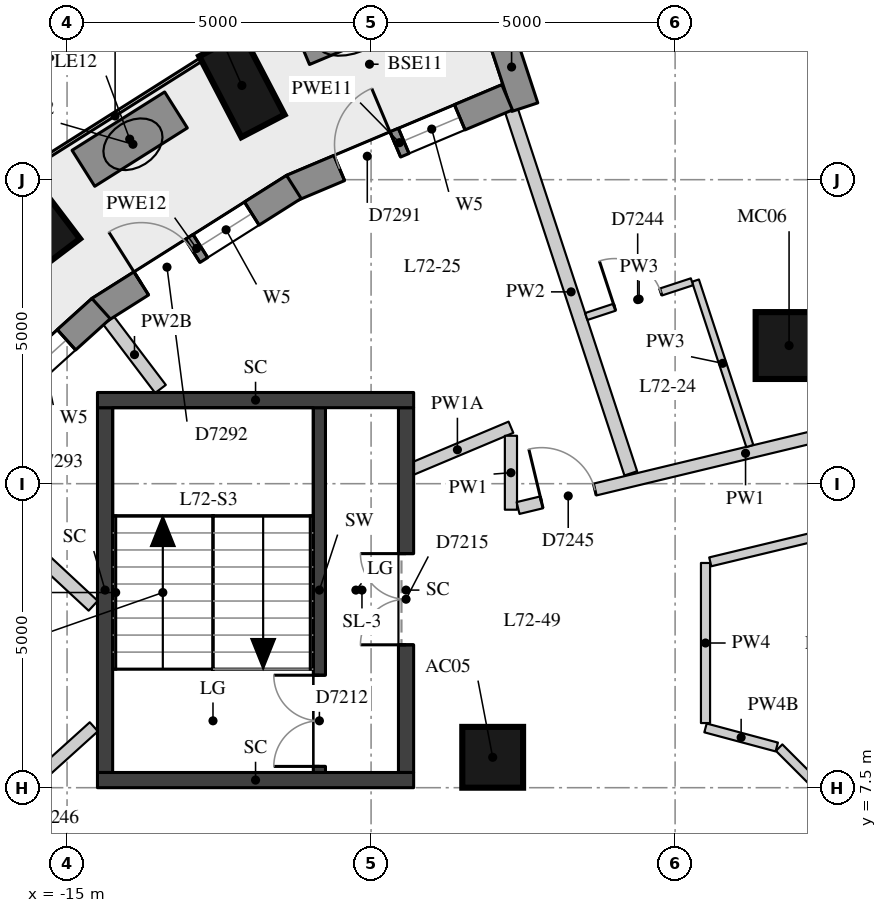
"""IFC4 building model, lengths in metres.
Left out: names, types, materials, properties, quantities, classifications, styles, units other than length and angle.
Written with IfcOpenShell. Run it as: python <this file> out.ifc"""

import sys

from ifc_helpers import new_model, si_unit, direction, frame, frame_2d, origin, origin_2d, place, context, subcontext, project, spatial, rectangle, extrude, element, fill, save


model = new_model("IFC4")
c1 = context("Model", 3, precision=1e-05, world=origin(), true_north=direction((0.0, 1.0)))
c2 = subcontext(c1, "Body", "Model", "MODEL_VIEW")
j1 = project(units=[si_unit("LENGTHUNIT", "METRE"), si_unit("PLANEANGLEUNIT", "RADIAN")], contexts=[c1])
p1 = place(None, origin())
s1 = spatial("IfcSite", under=j1, at=p1, CompositionType="ELEMENT")
p2 = place(p1, origin())
s2 = spatial("IfcBuilding", under=s1, at=p2, CompositionType="ELEMENT")
p3 = place(p2, frame((0.0, 0.0, 253.1)))
s3 = spatial("IfcBuildingStorey", under=s2, at=p3, CompositionType="ELEMENT", Elevation=253.1)
for number, where, z_axis, x_axis in (
    (1, (-12.125, 19.05, 0.0), (0.0, 0.0, 1.0), (-0.462, 0.887, 0.0)),
    (2, (-15.559, 16.885, 0.0), (0.0, 0.0, 1.0), (-0.604, 0.797, 0.0)),
):
    element("IfcColumn", number, at=place(p3, frame(where, z_axis=z_axis, x_axis=x_axis)), inside=s3, PredefinedType="COLUMN", context=c2, shape_type="SweptSolid", body=[
        extrude(rectangle(XDim=1.5, YDim=0.8, at=origin_2d()), origin(), (0.0, 0.0, 1.0), 3.3),
    ])
p4 = place(p3, frame((-8.0, 8.0, 0.0), z_axis=(0.0, 0.0, 1.0), x_axis=(1.0, 0.0, 0.0)))
e3 = element("IfcColumn", 3, at=p4, inside=s3, PredefinedType="COLUMN", context=c2, shape_type="SweptSolid", body=[
    extrude(rectangle(XDim=1.0, YDim=1.0, at=origin_2d()), origin(), (0.0, 0.0, 1.0), 3.3),
])
p5 = place(p3, frame((-3.126, 14.772, 0.0), z_axis=(0.0, 0.0, 1.0), x_axis=(1.0, 0.0, 0.0)))
e4 = element("IfcColumn", 4, at=p5, inside=s3, PredefinedType="COLUMN", context=c2, shape_type="SweptSolid", body=[
    extrude(rectangle(XDim=1.1, YDim=1.1, at=origin_2d()), origin(), (0.0, 0.0, 1.0), 3.3),
])
p6 = place(p3, frame((-7.906, 20.014, 0.0), z_axis=(0.0, 0.0, 1.0), x_axis=(0.312379684595, -0.949957332017, 0.0)))
e5 = element("IfcWall", 5, at=p6, inside=s3, PredefinedType="SOLIDWALL", context=c2, shape_type="SweptSolid", body=[
    extrude(rectangle(XDim=1.39, YDim=0.45, at=frame_2d((0.695, 0.0))), origin(), (0.0, 0.0, 1.0), 3.02),
])
p7 = place(p3, frame((-7.762, 18.855, 0.0), z_axis=(0.0, 0.0, 1.0), x_axis=(-0.921611451737, -0.388113813239, 0.0)))
e6 = element("IfcWall", 6, at=p7, inside=s3, PredefinedType="SOLIDWALL", context=c2, shape_type="SweptSolid", body=[
    extrude(rectangle(XDim=3.842, YDim=0.45, at=frame_2d((1.921, 0.0))), origin(), (0.0, 0.0, 1.0), 3.02),
])
p8 = place(p7, frame((0.846, 0.0, 0.4)))
e7 = element("IfcOpeningElement", 7, at=p8, cuts=e6, PredefinedType="OPENING", context=c2, shape_type="SweptSolid", body=[
    extrude(rectangle(XDim=1.0, YDim=1.75, at=frame_2d((0.5, 0.875))), frame((0.0, 0.235, 0.0), z_axis=(0.0, -1.0, 0.0), x_axis=(1.0, 0.0, 0.0)), (0.0, 0.0, 1.0), 0.47),
])
p9 = place(p7, frame((1.996, 0.0, 0.0)))
e8 = element("IfcOpeningElement", 8, at=p9, cuts=e6, PredefinedType="OPENING", context=c2, shape_type="SweptSolid", body=[
    extrude(rectangle(XDim=1.0, YDim=2.15, at=frame_2d((0.5, 1.075))), frame((0.0, 0.235, 0.0), z_axis=(0.0, -1.0, 0.0), x_axis=(1.0, 0.0, 0.0)), (0.0, 0.0, 1.0), 0.47),
])
p10 = place(p3, frame((-11.27, 17.381, 0.0), z_axis=(0.0, 0.0, 1.0), x_axis=(-0.845176295427, -0.534487632831, 0.0)))
e9 = element("IfcWall", 9, at=p10, inside=s3, PredefinedType="SOLIDWALL", context=c2, shape_type="SweptSolid", body=[
    extrude(rectangle(XDim=3.788, YDim=0.45, at=frame_2d((1.894, 0.0))), origin(), (0.0, 0.0, 1.0), 3.02),
])
p11 = place(p10, frame((0.819, 0.0, 0.4)))
e10 = element("IfcOpeningElement", 10, at=p11, cuts=e9, PredefinedType="OPENING", context=c2, shape_type="SweptSolid", body=[
    extrude(rectangle(XDim=1.0, YDim=1.75, at=frame_2d((0.5, 0.875))), frame((0.0, 0.235, 0.0), z_axis=(0.0, -1.0, 0.0), x_axis=(1.0, 0.0, 0.0)), (0.0, 0.0, 1.0), 0.47),
])
p12 = place(p10, frame((1.969, 0.0, 0.0)))
e11 = element("IfcOpeningElement", 11, at=p12, cuts=e9, PredefinedType="OPENING", context=c2, shape_type="SweptSolid", body=[
    extrude(rectangle(XDim=1.0, YDim=2.15, at=frame_2d((0.5, 1.075))), frame((0.0, 0.235, 0.0), z_axis=(0.0, -1.0, 0.0), x_axis=(1.0, 0.0, 0.0)), (0.0, 0.0, 1.0), 0.47),
])
p13 = place(p3, frame((-14.441, 15.38, 0.0), z_axis=(0.0, 0.0, 1.0), x_axis=(-0.742152631569, -0.670230909057, 0.0)))
e12 = element("IfcWall", 12, at=p13, inside=s3, PredefinedType="SOLIDWALL", context=c2, shape_type="SweptSolid", body=[
    extrude(rectangle(XDim=3.683, YDim=0.45, at=frame_2d((1.842, 0.0))), origin(), (0.0, 0.0, 1.0), 3.02),
])
p14 = place(p13, frame((0.767, 0.0, 0.4)))
e13 = element("IfcOpeningElement", 13, at=p14, cuts=e12, PredefinedType="OPENING", context=c2, shape_type="SweptSolid", body=[
    extrude(rectangle(XDim=1.0, YDim=1.75, at=frame_2d((0.5, 0.875))), frame((0.0, 0.235, 0.0), z_axis=(0.0, -1.0, 0.0), x_axis=(1.0, 0.0, 0.0)), (0.0, 0.0, 1.0), 0.47),
])
p15 = place(p13, frame((1.917, 0.0, 0.0)))
e14 = element("IfcOpeningElement", 14, at=p15, cuts=e12, PredefinedType="OPENING", context=c2, shape_type="SweptSolid", body=[
    extrude(rectangle(XDim=1.0, YDim=2.15, at=frame_2d((0.5, 1.075))), frame((0.0, 0.235, 0.0), z_axis=(0.0, -1.0, 0.0), x_axis=(1.0, 0.0, 0.0)), (0.0, 0.0, 1.0), 0.47),
])
for number, where, z_axis, x_axis in (
    (15, (-9.488, 20.414, 0.0), (0.0, 0.0, 1.0), (-0.922, -0.387, 0.0)),
    (16, (-13.208, 18.647, 0.0), (0.0, 0.0, 1.0), (-0.846, -0.533, 0.0)),
):
    element("IfcWall", number, at=place(p3, frame(where, z_axis=z_axis, x_axis=x_axis)), inside=s3, PredefinedType="USERDEFINED", context=c2, shape_type="SweptSolid", body=[
        extrude(rectangle(XDim=1.8, YDim=0.7, at=frame_2d((0.9, 0.0))), origin(), (0.0, 0.0, 1.0), 0.75),
    ])
p16 = place(p3, frame((-10.85, 7.75, 0.0), z_axis=(0.0, 0.0, 1.0), x_axis=(0.0, 1.0, 0.0)))
e17 = element("IfcWall", 17, at=p16, inside=s3, PredefinedType="SHEAR", context=c2, shape_type="SweptSolid", body=[
    extrude(rectangle(XDim=6.0, YDim=0.2, at=frame_2d((3.0, 0.0))), origin(), (0.0, 0.0, 1.0), 3.02),
])
p17 = place(p16, frame((0.1, 0.0, 0.0)))
e18 = element("IfcOpeningElement", 18, at=p17, cuts=e17, PredefinedType="OPENING", context=c2, shape_type="SweptSolid", body=[
    extrude(rectangle(XDim=1.5, YDim=2.1, at=frame_2d((0.75, 1.05))), frame((0.0, 0.11, 0.0), z_axis=(0.0, -1.0, 0.0), x_axis=(1.0, 0.0, 0.0)), (0.0, 0.0, 1.0), 0.22),
])
p18 = place(p3, frame((-14.375, 7.75, -0.28), z_axis=(0.0, 0.0, 1.0), x_axis=(0.0, 1.0, 0.0)))
e19 = element("IfcWall", 19, at=p18, inside=s3, PredefinedType="SHEAR", context=c2, shape_type="SweptSolid", body=[
    extrude(rectangle(XDim=6.0, YDim=0.25, at=frame_2d((3.0, 0.0))), origin(), (0.0, 0.0, 1.0), 3.3),
])
p19 = place(p3, frame((-9.425, 7.75, -0.28), z_axis=(0.0, 0.0, 1.0), x_axis=(0.0, 1.0, 0.0)))
e20 = element("IfcWall", 20, at=p19, inside=s3, PredefinedType="SHEAR", context=c2, shape_type="SweptSolid", body=[
    extrude(rectangle(XDim=6.0, YDim=0.25, at=frame_2d((3.0, 0.0))), origin(), (0.0, 0.0, 1.0), 3.3),
])
p20 = place(p19, frame((2.1, 0.0, 0.28)))
e21 = element("IfcOpeningElement", 21, at=p20, cuts=e20, PredefinedType="OPENING", context=c2, shape_type="SweptSolid", body=[
    extrude(rectangle(XDim=1.5, YDim=2.1, at=frame_2d((0.75, 1.05))), frame((0.0, 0.135, 0.0), z_axis=(0.0, -1.0, 0.0), x_axis=(1.0, 0.0, 0.0)), (0.0, 0.0, 1.0), 0.27),
])
for number, where, z_axis, x_axis in (
    (22, (-14.5, 13.875, -0.28), (0.0, 0.0, 1.0), (1.0, 0.0, 0.0)),
    (23, (-14.5, 7.625, -0.28), (0.0, 0.0, 1.0), (1.0, 0.0, 0.0)),
):
    element("IfcWall", number, at=place(p3, frame(where, z_axis=z_axis, x_axis=x_axis)), inside=s3, PredefinedType="SHEAR", context=c2, shape_type="SweptSolid", body=[
        extrude(rectangle(XDim=5.2, YDim=0.25, at=frame_2d((2.6, 0.0))), origin(), (0.0, 0.0, 1.0), 3.3),
    ])
p21 = place(p3, frame((-16.24, 6.984, 0.0), z_axis=(0.0, 0.0, 1.0), x_axis=(0.742140692687, 0.67024412885, 0.0)))
e24 = element("IfcWall", 24, at=p21, inside=s3, PredefinedType="PARTITIONING", context=c2, shape_type="SweptSolid", body=[
    extrude(rectangle(XDim=2.265, YDim=0.2, at=frame_2d((1.132, 0.0))), origin(), (0.0, 0.0, 1.0), 3.02),
])
p22 = place(p3, frame((-9.46, 12.687, 0.0), z_axis=(0.0, 0.0, 1.0), x_axis=(0.92164499827, 0.388034144328, 0.0)))
e25 = element("IfcWall", 25, at=p22, inside=s3, PredefinedType="PARTITIONING", context=c2, shape_type="SweptSolid", body=[
    extrude(rectangle(XDim=1.91, YDim=0.2, at=frame_2d((0.955, 0.0))), origin(), (0.0, 0.0, 1.0), 2.57),
])
p23 = place(p3, frame((-7.7, 13.288, 0.0), z_axis=(0.0, 0.0, 1.0), x_axis=(0.0, -1.0, 0.0)))
e26 = element("IfcWall", 26, at=p23, inside=s3, PredefinedType="PARTITIONING", context=c2, shape_type="SweptSolid", body=[
    extrude(rectangle(XDim=1.216, YDim=0.2, at=frame_2d((0.608, 0.0))), origin(), (0.0, 0.0, 1.0), 3.02),
])
p24 = place(p3, frame((-7.583, 12.1, 0.0), z_axis=(0.0, 0.0, 1.0), x_axis=(0.97226305798, 0.233890029903, 0.0)))
e27 = element("IfcWall", 27, at=p24, inside=s3, PredefinedType="PARTITIONING", context=c2, shape_type="SweptSolid", body=[
    extrude(rectangle(XDim=7.696, YDim=0.2, at=frame_2d((3.848, 0.0))), origin(), (0.0, 0.0, 1.0), 3.02),
])
p25 = place(p24, frame((5.85, 0.0, 0.0)))
e28 = element("IfcOpeningElement", 28, at=p25, cuts=e27, PredefinedType="OPENING", context=c2, shape_type="SweptSolid", body=[
    extrude(rectangle(XDim=1.1, YDim=2.1, at=frame_2d((0.55, 1.05))), frame((0.0, 0.11, 0.0), z_axis=(0.0, -1.0, 0.0), x_axis=(1.0, 0.0, 0.0)), (0.0, 0.0, 1.0), 0.22),
])
p26 = place(p24, frame((0.399, 0.0, 0.0)))
e29 = element("IfcOpeningElement", 29, at=p26, cuts=e27, PredefinedType="OPENING", context=c2, shape_type="SweptSolid", body=[
    extrude(rectangle(XDim=0.9, YDim=2.1, at=frame_2d((0.45, 1.05))), frame((0.0, 0.11, 0.0), z_axis=(0.0, -1.0, 0.0), x_axis=(1.0, 0.0, 0.0)), (0.0, 0.0, 1.0), 0.22),
])
p27 = place(p3, frame((-0.927, 5.797, 0.0), z_axis=(0.0, 0.0, 1.0), x_axis=(-0.707106781187, 0.707106781187, 0.0)))
e30 = element("IfcWall", 30, at=p27, inside=s3, PredefinedType="PARTITIONING", context=c2, shape_type="SweptSolid", body=[
    extrude(rectangle(XDim=3.341, YDim=0.15, at=frame_2d((1.67, 0.0))), origin(), (0.0, 0.0, 1.0), 3.02),
])
p28 = place(p3, frame((-3.328, 8.169, 0.0), z_axis=(0.0, 0.0, 1.0), x_axis=(-0.965933680277, 0.258789731841, 0.0)))
e31 = element("IfcWall", 31, at=p28, inside=s3, PredefinedType="PARTITIONING", context=c2, shape_type="SweptSolid", body=[
    extrude(rectangle(XDim=1.213, YDim=0.15, at=frame_2d((0.606, 0.0))), origin(), (0.0, 0.0, 1.0), 2.47),
])
p29 = place(p3, frame((-4.5, 8.563, 0.0), z_axis=(0.0, 0.0, 1.0), x_axis=(0.0, 1.0, 0.0)))
e32 = element("IfcWall", 32, at=p29, inside=s3, PredefinedType="PARTITIONING", context=c2, shape_type="SweptSolid", body=[
    extrude(rectangle(XDim=2.633, YDim=0.15, at=frame_2d((1.316, 0.0))), origin(), (0.0, 0.0, 1.0), 3.02),
])
p30 = place(p3, frame((-4.422, 11.215, 0.0), z_axis=(0.0, 0.0, 1.0), x_axis=(0.972256385538, 0.233917764997, 0.0)))
e33 = element("IfcWall", 33, at=p30, inside=s3, PredefinedType="PARTITIONING", context=c2, shape_type="SweptSolid", body=[
    extrude(rectangle(XDim=4.491, YDim=0.15, at=frame_2d((2.246, 0.0))), origin(), (0.0, 0.0, 1.0), 3.02),
])
p31 = place(p3, frame((-7.692, 18.64, 0.0), z_axis=(0.0, 0.0, 1.0), x_axis=(0.312298025569, -0.949984180514, 0.0)))
e34 = element("IfcWall", 34, at=p31, inside=s3, PredefinedType="PARTITIONING", context=c2, shape_type="SweptSolid", body=[
    extrude(rectangle(XDim=6.285, YDim=0.22, at=frame_2d((3.143, 0.0))), origin(), (0.0, 0.0, 1.0), 3.02),
])
p32 = place(p3, frame((-14.319, 15.187, 0.0), z_axis=(0.0, 0.0, 1.0), x_axis=(0.603937349714, -0.797031792101, 0.0)))
e35 = element("IfcWall", 35, at=p32, inside=s3, PredefinedType="PARTITIONING", context=c2, shape_type="SweptSolid", body=[
    extrude(rectangle(XDim=1.416, YDim=0.22, at=frame_2d((0.708, 0.0))), origin(), (0.0, 0.0, 1.0), 2.57),
])
p33 = place(p3, frame((-17.009, 12.758, 0.0), z_axis=(0.0, 0.0, 1.0), x_axis=(0.732631495403, -0.680625515202, 0.0)))
e36 = element("IfcWall", 36, at=p33, inside=s3, PredefinedType="PARTITIONING", context=c2, shape_type="SweptSolid", body=[
    extrude(rectangle(XDim=3.328, YDim=0.22, at=frame_2d((1.664, 0.0))), origin(), (0.0, 0.0, 1.0), 3.02),
])
p34 = place(p3, frame((-22.004, 7.424, 0.0), z_axis=(0.0, 0.0, 1.0), x_axis=(0.927533826991, -0.373739213607, 0.0)))
e37 = element("IfcWall", 37, at=p34, inside=s3, PredefinedType="PARTITIONING", context=c2, shape_type="SweptSolid", body=[
    extrude(rectangle(XDim=7.614, YDim=0.22, at=frame_2d((3.807, 0.0))), origin(), (0.0, 0.0, 1.0), 3.02),
])
p35 = place(p3, frame((-3.771, 13.12, 0.0), z_axis=(0.0, 0.0, 1.0), x_axis=(-0.312336886671, 0.949971404425, 0.0)))
e38 = element("IfcWall", 38, at=p35, inside=s3, PredefinedType="PARTITIONING", context=c2, shape_type="SweptSolid", body=[
    extrude(rectangle(XDim=2.863, YDim=0.12, at=frame_2d((1.432, 0.0))), origin(), (0.0, 0.0, 1.0), 3.02),
])
p36 = place(p3, frame((-4.722, 15.821, 0.0), z_axis=(0.0, 0.0, 1.0), x_axis=(-0.949995576072, -0.312263359111, 0.0)))
e39 = element("IfcWall", 39, at=p36, inside=s3, PredefinedType="PARTITIONING", context=c2, shape_type="SweptSolid", body=[
    extrude(rectangle(XDim=1.83, YDim=0.12, at=frame_2d((0.915, 0.0))), origin(), (0.0, 0.0, 1.0), 3.02),
])
p37 = place(p36, frame((0.54, 0.0, 0.0)))
e40 = element("IfcOpeningElement", 40, at=p37, cuts=e39, PredefinedType="OPENING", context=c2, shape_type="SweptSolid", body=[
    extrude(rectangle(XDim=0.8, YDim=2.1, at=frame_2d((0.4, 1.05))), frame((0.0, 0.07, 0.0), z_axis=(0.0, -1.0, 0.0), x_axis=(1.0, 0.0, 0.0)), (0.0, 0.0, 1.0), 0.14),
])
p38 = place(p8, origin())
e41 = element("IfcWindow", 41, at=p38, inside=s3, PartitioningType="SINGLE_PANEL", PredefinedType="WINDOW", context=c2, shape_type="SweptSolid", body=[
    extrude(rectangle(XDim=1.0, YDim=1.75, at=frame_2d((0.5, 0.875))), frame((0.0, 0.035, 0.0), z_axis=(0.0, -1.0, 0.0), x_axis=(1.0, 0.0, 0.0)), (0.0, 0.0, 1.0), 0.06),
])
fill(e7, e41)
p39 = place(p9, frame((1.0, 0.0, 0.0), z_axis=(0.0, 0.0, 1.0), x_axis=(-1.0, 0.0, 0.0)))
e42 = element("IfcDoor", 42, at=p39, inside=s3, OperationType="SINGLE_SWING_RIGHT", PredefinedType="DOOR", context=c2, shape_type="SweptSolid", body=[
    extrude(rectangle(XDim=1.0, YDim=2.15, at=frame_2d((0.5, 1.075))), frame((0.0, 0.075, 0.0), z_axis=(0.0, -1.0, 0.0), x_axis=(1.0, 0.0, 0.0)), (0.0, 0.0, 1.0), 0.05),
])
fill(e8, e42)
p40 = place(p11, origin())
e43 = element("IfcWindow", 43, at=p40, inside=s3, PartitioningType="SINGLE_PANEL", PredefinedType="WINDOW", context=c2, shape_type="SweptSolid", body=[
    extrude(rectangle(XDim=1.0, YDim=1.75, at=frame_2d((0.5, 0.875))), frame((0.0, 0.035, 0.0), z_axis=(0.0, -1.0, 0.0), x_axis=(1.0, 0.0, 0.0)), (0.0, 0.0, 1.0), 0.06),
])
fill(e10, e43)
p41 = place(p12, frame((1.0, 0.0, 0.0), z_axis=(0.0, 0.0, 1.0), x_axis=(-1.0, 0.0, 0.0)))
e44 = element("IfcDoor", 44, at=p41, inside=s3, OperationType="SINGLE_SWING_LEFT", PredefinedType="DOOR", context=c2, shape_type="SweptSolid", body=[
    extrude(rectangle(XDim=1.0, YDim=2.15, at=frame_2d((0.5, 1.075))), frame((0.0, 0.075, 0.0), z_axis=(0.0, -1.0, 0.0), x_axis=(1.0, 0.0, 0.0)), (0.0, 0.0, 1.0), 0.05),
])
fill(e11, e44)
p42 = place(p14, origin())
e45 = element("IfcWindow", 45, at=p42, inside=s3, PartitioningType="SINGLE_PANEL", PredefinedType="WINDOW", context=c2, shape_type="SweptSolid", body=[
    extrude(rectangle(XDim=1.0, YDim=1.75, at=frame_2d((0.5, 0.875))), frame((0.0, 0.035, 0.0), z_axis=(0.0, -1.0, 0.0), x_axis=(1.0, 0.0, 0.0)), (0.0, 0.0, 1.0), 0.06),
])
fill(e13, e45)
p43 = place(p17, origin())
e46 = element("IfcDoor", 46, at=p43, inside=s3, OperationType="DOUBLE_DOOR_SINGLE_SWING", PredefinedType="DOOR", context=c2, shape_type="SweptSolid", body=[
    extrude(rectangle(XDim=1.5, YDim=2.1, at=frame_2d((0.75, 1.05))), frame((0.0, 0.025, 0.0), z_axis=(0.0, -1.0, 0.0), x_axis=(1.0, 0.0, 0.0)), (0.0, 0.0, 1.0), 0.05),
])
fill(e18, e46)
p44 = place(p20, origin())
e47 = element("IfcDoor", 47, at=p44, inside=s3, OperationType="DOUBLE_DOOR_SINGLE_SWING", PredefinedType="DOOR", context=c2, shape_type="SweptSolid", body=[
    extrude(rectangle(XDim=1.5, YDim=2.1, at=frame_2d((0.75, 1.05))), frame((0.0, 0.025, 0.0), z_axis=(0.0, -1.0, 0.0), x_axis=(1.0, 0.0, 0.0)), (0.0, 0.0, 1.0), 0.05),
])
fill(e21, e47)
p45 = place(p37, origin())
e48 = element("IfcDoor", 48, at=p45, inside=s3, OperationType="SINGLE_SWING_LEFT", PredefinedType="DOOR", context=c2, shape_type="SweptSolid", body=[
    extrude(rectangle(XDim=0.8, YDim=2.1, at=frame_2d((0.4, 1.05))), frame((0.0, 0.025, 0.0), z_axis=(0.0, -1.0, 0.0), x_axis=(1.0, 0.0, 0.0)), (0.0, 0.0, 1.0), 0.05),
])
fill(e40, e48)
p46 = place(p26, origin())
e49 = element("IfcDoor", 49, at=p46, inside=s3, OperationType="SINGLE_SWING_LEFT", PredefinedType="DOOR", context=c2, shape_type="SweptSolid", body=[
    extrude(rectangle(XDim=0.9, YDim=2.1, at=frame_2d((0.45, 1.05))), frame((0.0, 0.025, 0.0), z_axis=(0.0, -1.0, 0.0), x_axis=(1.0, 0.0, 0.0)), (0.0, 0.0, 1.0), 0.05),
])
fill(e29, e49)
save(model, sys.argv[1])
